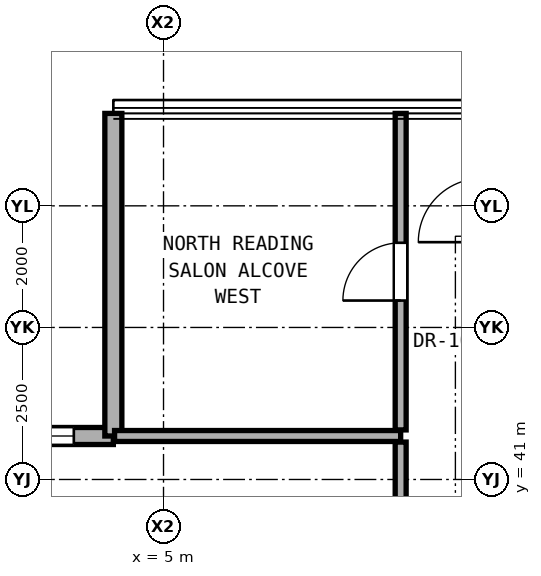
"""IFC4 building model, lengths in metres.
Left out: names, types, materials, properties, quantities, classifications, styles, units other than length and angle.
Written with IfcOpenShell. Run it as: python <this file> out.ifc"""

import sys

from ifc_helpers import new_model, si_unit, direction, frame, frame_2d, origin, place, context, subcontext, project, spatial, rectangle, extrude, element, fill, save


model = new_model("IFC4")
c1 = context("Model", 3, precision=1e-05, world=origin(), true_north=direction((0.0, 1.0)))
c2 = subcontext(c1, "Body", "Model", "MODEL_VIEW")
j1 = project(units=[si_unit("LENGTHUNIT", "METRE"), si_unit("PLANEANGLEUNIT", "RADIAN")], contexts=[c1])
p1 = place(None, origin())
s1 = spatial("IfcSite", under=j1, at=p1, CompositionType="ELEMENT")
p2 = place(p1, origin())
s2 = spatial("IfcBuilding", under=s1, at=p2, CompositionType="ELEMENT")
p3 = place(p2, frame((0.0, 0.0, 104.9)))
s3 = spatial("IfcBuildingStorey", under=s2, at=p3, CompositionType="ELEMENT", Elevation=104.9)
p4 = place(p3, frame((4.175, 41.715, 0.0), z_axis=(0.0, 0.0, 1.0), x_axis=(-1.0, 0.0, 0.0)))
e1 = element("IfcWall", 1, at=p4, inside=s3, PredefinedType="SOLIDWALL", context=c2, shape_type="SweptSolid", body=[
    extrude(rectangle(XDim=5.305, YDim=0.28, at=frame_2d((2.652, 0.0))), origin(), (0.0, 0.0, 1.0), 3.06),
])
p5 = place(p4, frame((0.65, 0.0, 0.85)))
e2 = element("IfcOpeningElement", 2, at=p5, cuts=e1, PredefinedType="OPENING", context=c2, shape_type="SweptSolid", body=[
    extrude(rectangle(XDim=1.1, YDim=2.0, at=frame_2d((0.55, 1.0))), frame((0.0, 0.15, 0.0), z_axis=(0.0, -1.0, 0.0), x_axis=(1.0, 0.0, 0.0)), (0.0, 0.0, 1.0), 0.3),
])
p6 = place(p3, frame((4.175, 47.02, 0.0), z_axis=(0.0, 0.0, 1.0), x_axis=(0.0, -1.0, 0.0)))
e3 = element("IfcWall", 3, at=p6, inside=s3, PredefinedType="SOLIDWALL", context=c2, shape_type="SweptSolid", body=[
    extrude(rectangle(XDim=5.305, YDim=0.28, at=frame_2d((2.652, 0.0))), origin(), (0.0, 0.0, 1.0), 3.06),
])
p7 = place(p3, frame((4.195, 41.715, 0.0), z_axis=(0.0, 0.0, 1.0), x_axis=(1.0, 0.0, 0.0)))
e4 = element("IfcWall", 4, at=p7, inside=s3, PredefinedType="PARTITIONING", context=c2, shape_type="SweptSolid", body=[
    extrude(rectangle(XDim=4.705, YDim=0.18, at=frame_2d((2.353, 0.0))), origin(), (0.0, 0.0, 1.0), 3.08),
])
p8 = place(p3, frame((8.9, 37.133, 0.0), z_axis=(0.0, 0.0, 1.0), x_axis=(0.0, 1.0, 0.0)))
e5 = element("IfcWall", 5, at=p8, inside=s3, PredefinedType="PARTITIONING", context=c2, shape_type="SweptSolid", body=[
    extrude(rectangle(XDim=4.482, YDim=0.18, at=frame_2d((2.241, 0.0))), origin(), (0.0, 0.0, 1.0), 2.456),
])
p9 = place(p8, frame((0.766, 0.0, 0.0)))
e6 = element("IfcOpeningElement", 6, at=p9, cuts=e5, PredefinedType="OPENING", context=c2, shape_type="SweptSolid", body=[
    extrude(rectangle(XDim=1.05, YDim=2.2, at=frame_2d((0.525, 1.1))), frame((0.0, 0.1, 0.0), z_axis=(0.0, -1.0, 0.0), x_axis=(1.0, 0.0, 0.0)), (0.0, 0.0, 1.0), 0.2),
])
p10 = place(p3, frame((8.9, 41.815, 0.0), z_axis=(0.0, 0.0, 1.0), x_axis=(0.0, 1.0, 0.0)))
e7 = element("IfcWall", 7, at=p10, inside=s3, PredefinedType="PARTITIONING", context=c2, shape_type="SweptSolid", body=[
    extrude(rectangle(XDim=5.205, YDim=0.18, at=frame_2d((2.603, 0.0))), origin(), (0.0, 0.0, 1.0), 3.08),
])
p11 = place(p10, frame((2.127, 0.0, 0.0)))
e8 = element("IfcOpeningElement", 8, at=p11, cuts=e7, PredefinedType="OPENING", context=c2, shape_type="SweptSolid", body=[
    extrude(rectangle(XDim=0.95, YDim=2.15, at=frame_2d((0.475, 1.075))), frame((0.0, 0.1, 0.0), z_axis=(0.0, -1.0, 0.0), x_axis=(1.0, 0.0, 0.0)), (0.0, 0.0, 1.0), 0.2),
])
p12 = place(p5, origin())
e9 = element("IfcWindow", 9, at=p12, inside=s3, PartitioningType="SINGLE_PANEL", PredefinedType="WINDOW", context=c2, shape_type="SweptSolid", body=[
    extrude(rectangle(XDim=1.1, YDim=2.0, at=frame_2d((0.55, 1.0))), frame((0.0, 0.03, 0.0), z_axis=(0.0, -1.0, 0.0), x_axis=(1.0, 0.0, 0.0)), (0.0, 0.0, 1.0), 0.06),
])
fill(e2, e9)
p13 = place(p11, origin())
e10 = element("IfcDoor", 10, at=p13, inside=s3, OperationType="SINGLE_SWING_LEFT", PredefinedType="DOOR", context=c2, shape_type="SweptSolid", body=[
    extrude(rectangle(XDim=0.95, YDim=2.15, at=frame_2d((0.475, 1.075))), frame((0.0, 0.025, 0.0), z_axis=(0.0, -1.0, 0.0), x_axis=(1.0, 0.0, 0.0)), (0.0, 0.0, 1.0), 0.05),
])
fill(e8, e10)
save(model, sys.argv[1])
